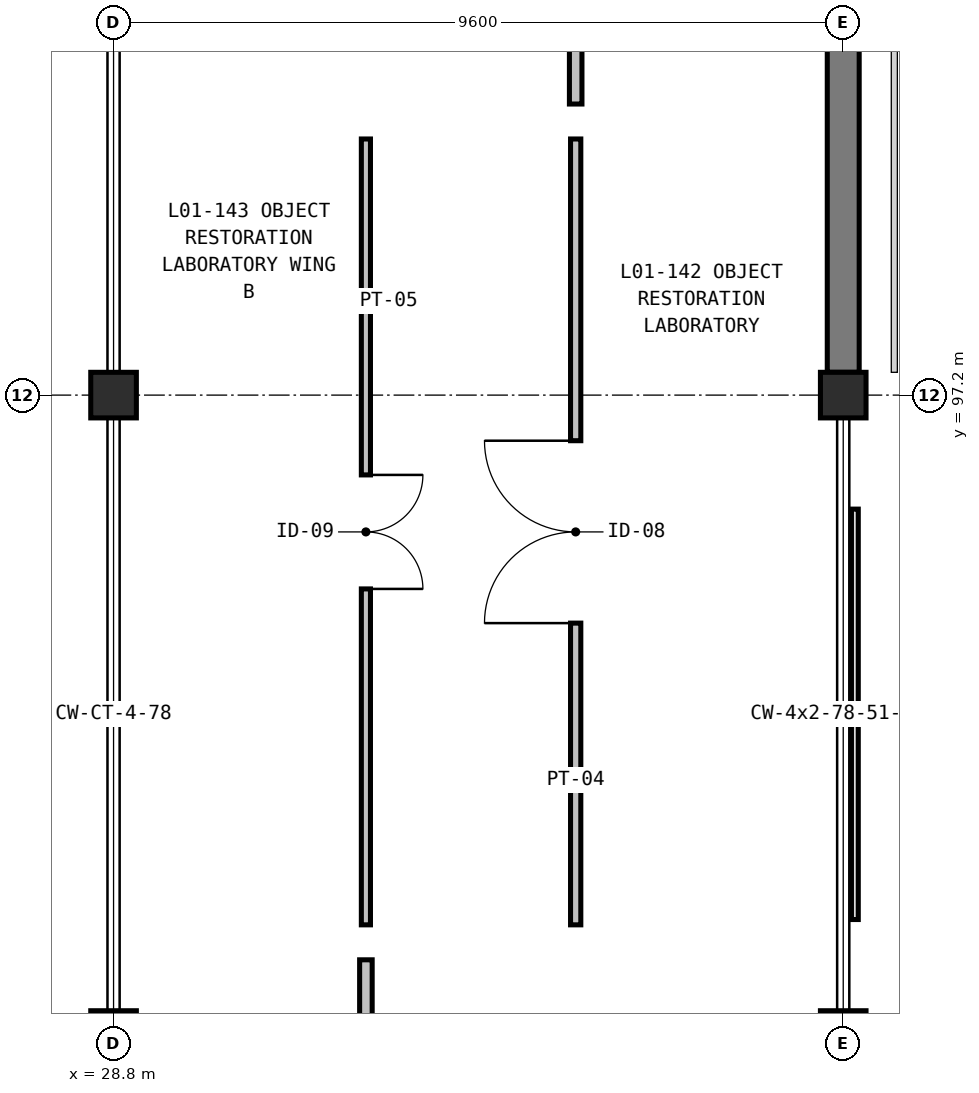
"""IFC4 building model, lengths in metres.
Left out: names, types, materials, properties, quantities, classifications, styles, units other than length and angle.
Written with IfcOpenShell. Run it as: python <this file> out.ifc"""

import sys

from ifc_helpers import new_model, si_unit, direction, frame, frame_2d, origin, origin_2d, place, context, subcontext, project, spatial, rectangle, extrude, element, fill, save


model = new_model("IFC4")
c1 = context("Model", 3, precision=1e-05, world=origin(), true_north=direction((0.0, 1.0)))
c2 = subcontext(c1, "Body", "Model", "MODEL_VIEW")
j1 = project(units=[si_unit("LENGTHUNIT", "METRE"), si_unit("PLANEANGLEUNIT", "RADIAN")], contexts=[c1])
p1 = place(None, origin())
s1 = spatial("IfcSite", under=j1, at=p1, CompositionType="ELEMENT")
p2 = place(p1, origin())
s2 = spatial("IfcBuilding", under=s1, at=p2, CompositionType="ELEMENT")
p3 = place(p2, frame((0.0, 0.0, 6.0)))
s3 = spatial("IfcBuildingStorey", under=s2, at=p3, CompositionType="ELEMENT", Elevation=6.0)
for number, where, z_axis, x_axis in (
    (1, (28.8, 88.8, 0.0), (0.0, 0.0, 1.0), (1.0, 0.0, 0.0)),
    (2, (28.8, 97.2, 0.0), (0.0, 0.0, 1.0), (1.0, 0.0, 0.0)),
    (3, (38.4, 88.8, 0.0), (0.0, 0.0, 1.0), (1.0, 0.0, 0.0)),
    (4, (38.4, 97.2, 0.0), (0.0, 0.0, 1.0), (1.0, 0.0, 0.0)),
):
    element("IfcColumn", number, at=place(p3, frame(where, z_axis=z_axis, x_axis=x_axis)), inside=s3, PredefinedType="COLUMN", context=c2, shape_type="SweptSolid", body=[
        extrude(rectangle(XDim=0.6, YDim=0.6, at=origin_2d()), origin(), (0.0, 0.0, 1.0), 5.4),
    ])
p4 = place(p3, frame((38.4, 105.3, 0.0), z_axis=(0.0, 0.0, 1.0), x_axis=(0.0, -1.0, 0.0)))
e5 = element("IfcWall", 5, at=p4, inside=s3, PredefinedType="SOLIDWALL", context=c2, shape_type="SweptSolid", body=[
    extrude(rectangle(XDim=7.8, YDim=0.42, at=frame_2d((3.9, 0.0))), origin(), (0.0, 0.0, 1.0), 5.08),
])
p5 = place(p3, frame((32.12, 89.77, 0.0), z_axis=(0.0, 0.0, 1.0), x_axis=(0.0, -1.0, 0.0)))
e6 = element("IfcWall", 6, at=p5, inside=s3, PredefinedType="PARTITIONING", context=c2, shape_type="SweptSolid", body=[
    extrude(rectangle(XDim=10.02, YDim=0.165, at=frame_2d((5.01, 0.0))), origin(), (0.0, 0.0, 1.0), 4.305),
])
p6 = place(p5, frame((4.51, 0.0, 0.0)))
e7 = element("IfcOpeningElement", 7, at=p6, cuts=e6, PredefinedType="OPENING", context=c2, shape_type="SweptSolid", body=[
    extrude(rectangle(XDim=1.0, YDim=2.15, at=frame_2d((0.5, 1.075))), frame((0.0, 0.093, 0.0), z_axis=(0.0, -1.0, 0.0), x_axis=(1.0, 0.0, 0.0)), (0.0, 0.0, 1.0), 0.185),
])
p7 = place(p3, frame((34.88, 90.23, 0.0), z_axis=(0.0, 0.0, 1.0), x_axis=(0.0, 1.0, 0.0)))
e8 = element("IfcWall", 8, at=p7, inside=s3, PredefinedType="PARTITIONING", context=c2, shape_type="SweptSolid", body=[
    extrude(rectangle(XDim=10.34, YDim=0.135, at=frame_2d((5.17, 0.0))), origin(), (0.0, 0.0, 1.0), 4.305),
])
p8 = place(p7, frame((3.97, 0.0, 0.0)))
e9 = element("IfcOpeningElement", 9, at=p8, cuts=e8, PredefinedType="OPENING", context=c2, shape_type="SweptSolid", body=[
    extrude(rectangle(XDim=2.4, YDim=2.6, at=frame_2d((1.2, 1.3))), frame((0.0, 0.077, 0.0), z_axis=(0.0, -1.0, 0.0), x_axis=(1.0, 0.0, 0.0)), (0.0, 0.0, 1.0), 0.155),
])
p9 = place(p3, frame((32.12, 100.57, 0.0), z_axis=(0.0, 0.0, 1.0), x_axis=(0.0, -1.0, 0.0)))
e10 = element("IfcWall", 10, at=p9, inside=s3, PredefinedType="PARTITIONING", context=c2, shape_type="SweptSolid", body=[
    extrude(rectangle(XDim=10.34, YDim=0.12, at=frame_2d((5.17, 0.0))), origin(), (0.0, 0.0, 1.0), 4.305),
])
p10 = place(p9, frame((4.42, 0.0, 0.0)))
e11 = element("IfcOpeningElement", 11, at=p10, cuts=e10, PredefinedType="OPENING", context=c2, shape_type="SweptSolid", body=[
    extrude(rectangle(XDim=1.5, YDim=2.3, at=frame_2d((0.75, 1.15))), frame((0.0, 0.07, 0.0), z_axis=(0.0, -1.0, 0.0), x_axis=(1.0, 0.0, 0.0)), (0.0, 0.0, 1.0), 0.14),
])
p11 = place(p3, frame((34.88, 101.03, 0.0), z_axis=(0.0, 0.0, 1.0), x_axis=(0.0, 1.0, 0.0)))
e12 = element("IfcWall", 12, at=p11, inside=s3, PredefinedType="PARTITIONING", context=c2, shape_type="SweptSolid", body=[
    extrude(rectangle(XDim=10.34, YDim=0.165, at=frame_2d((5.17, 0.0))), origin(), (0.0, 0.0, 1.0), 4.305),
])
p12 = place(p11, frame((4.27, 0.0, 0.0)))
e13 = element("IfcOpeningElement", 13, at=p12, cuts=e12, PredefinedType="OPENING", context=c2, shape_type="SweptSolid", body=[
    extrude(rectangle(XDim=1.8, YDim=2.4, at=frame_2d((0.9, 1.2))), frame((0.0, 0.093, 0.0), z_axis=(0.0, -1.0, 0.0), x_axis=(1.0, 0.0, 0.0)), (0.0, 0.0, 1.0), 0.185),
])
p13 = place(p8, origin())
e14 = element("IfcDoor", 14, at=p13, inside=s3, OperationType="DOUBLE_DOOR_SINGLE_SWING", PredefinedType="DOOR", context=c2, shape_type="SweptSolid", body=[
    extrude(rectangle(XDim=2.4, YDim=2.6, at=frame_2d((1.2, 1.3))), frame((0.0, 0.025, 0.0), z_axis=(0.0, -1.0, 0.0), x_axis=(1.0, 0.0, 0.0)), (0.0, 0.0, 1.0), 0.05),
])
fill(e9, e14)
p14 = place(p10, origin())
e15 = element("IfcDoor", 15, at=p14, inside=s3, OperationType="DOUBLE_DOOR_SINGLE_SWING", PredefinedType="DOOR", context=c2, shape_type="SweptSolid", body=[
    extrude(rectangle(XDim=1.5, YDim=2.3, at=frame_2d((0.75, 1.15))), frame((0.0, 0.025, 0.0), z_axis=(0.0, -1.0, 0.0), x_axis=(1.0, 0.0, 0.0)), (0.0, 0.0, 1.0), 0.05),
])
fill(e11, e15)
save(model, sys.argv[1])
